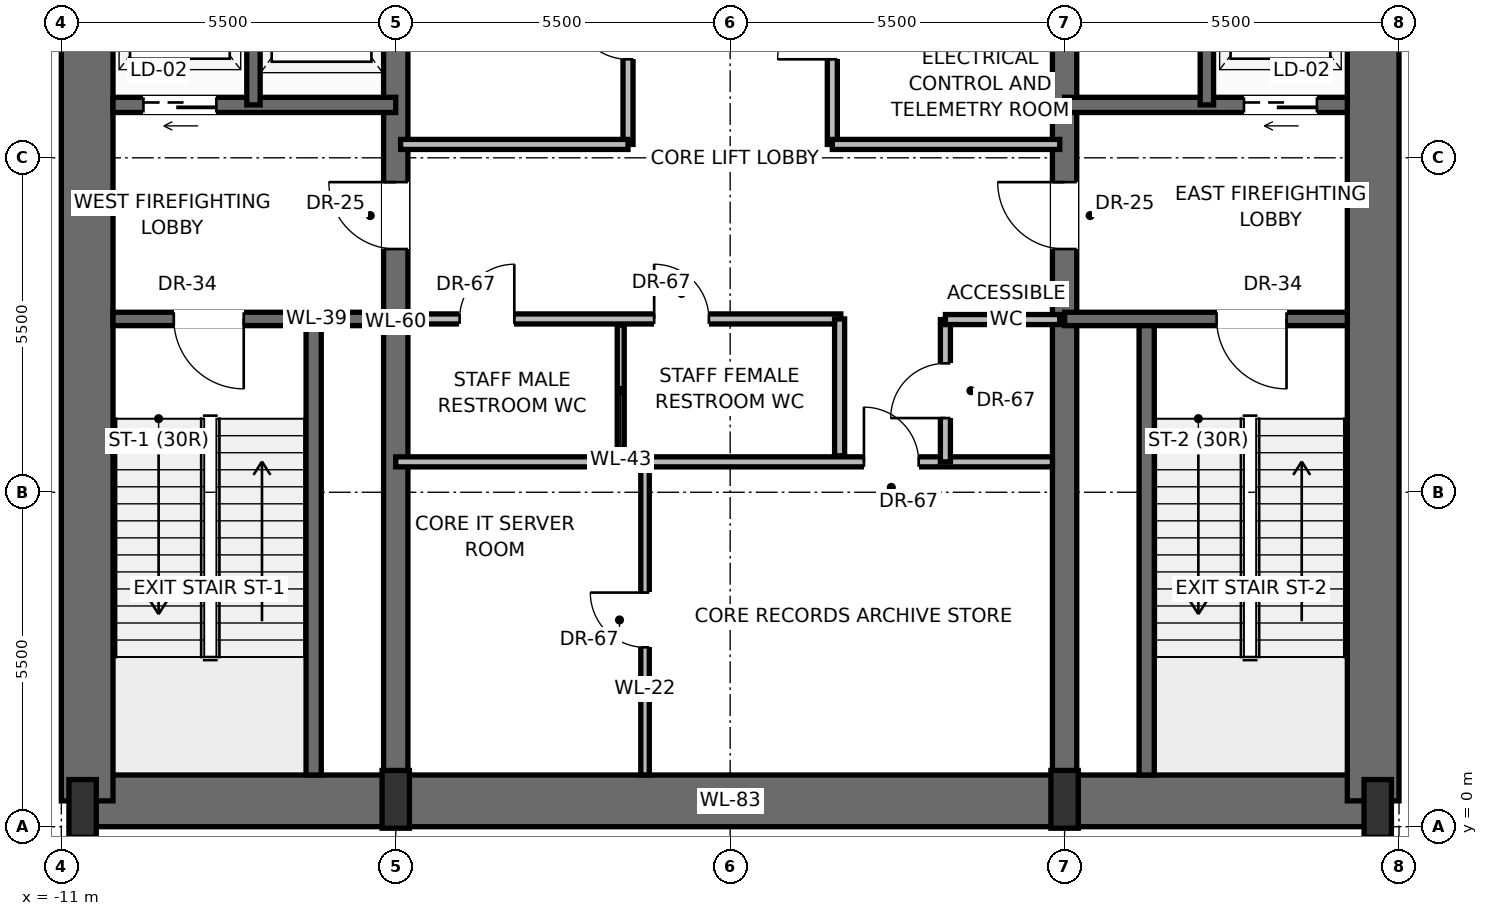
"""IFC4 building model, lengths in metres.
Left out: names, types, materials, properties, quantities, classifications, styles, units other than length and angle.
Written with IfcOpenShell. Run it as: python <this file> out.ifc"""

import sys

from ifc_helpers import new_model, si_unit, direction, frame, frame_2d, origin, origin_2d, place, context, subcontext, project, spatial, rectangle, extrude, source, transform, mapped, element, fill, save


model = new_model("IFC4")
c1 = context("Model", 3, precision=1e-05, world=origin(), true_north=direction((0.0, 1.0)))
c2 = subcontext(c1, "Body", "Model", "MODEL_VIEW")
j1 = project(units=[si_unit("LENGTHUNIT", "METRE"), si_unit("PLANEANGLEUNIT", "RADIAN")], contexts=[c1])
p1 = place(None, origin())
s1 = spatial("IfcSite", under=j1, at=p1, CompositionType="ELEMENT")
p2 = place(p1, origin())
s2 = spatial("IfcBuilding", under=s1, at=p2, CompositionType="ELEMENT")
p3 = place(p2, frame((0.0, 0.0, -10.0)))
s3 = spatial("IfcBuildingStorey", under=s2, at=p3, CompositionType="ELEMENT", Elevation=-10.0)
p4 = place(p3, frame((-10.65, 0.425, 0.0), z_axis=(0.0, 0.0, 1.0), x_axis=(1.0, 0.0, 0.0)))
e1 = element("IfcWall", 1, at=p4, inside=s3, PredefinedType="SHEAR", context=c2, shape_type="SweptSolid", body=[
    extrude(rectangle(XDim=21.3, YDim=0.85, at=frame_2d((10.65, 0.0))), origin(), (0.0, 0.0, 1.0), 4.6),
])
for number, where, z_axis, x_axis in (
    (2, (-10.575, 0.425, 0.0), (0.0, 0.0, 1.0), (0.0, 1.0, 0.0)),
    (3, (10.575, 0.425, 0.0), (0.0, 0.0, 1.0), (0.0, 1.0, 0.0)),
):
    element("IfcWall", number, at=place(p3, frame(where, z_axis=z_axis, x_axis=x_axis)), inside=s3, PredefinedType="SHEAR", context=c2, shape_type="SweptSolid", body=[
        extrude(rectangle(XDim=15.75, YDim=0.85, at=frame_2d((7.875, 0.0))), origin(), (0.0, 0.0, 1.0), 4.6),
    ])
p5 = place(p3, frame((-5.5, 0.425, 0.0), z_axis=(0.0, 0.0, 1.0), x_axis=(0.0, 1.0, 0.0)))
e4 = element("IfcWall", 4, at=p5, inside=s3, PredefinedType="SHEAR", context=c2, shape_type="SweptSolid", body=[
    extrude(rectangle(XDim=15.75, YDim=0.4, at=frame_2d((7.875, 0.0))), origin(), (0.0, 0.0, 1.0), 4.6),
])
p6 = place(p5, frame((9.075, 0.0, 0.0)))
e5 = element("IfcOpeningElement", 5, at=p6, cuts=e4, PredefinedType="OPENING", context=c2, shape_type="SweptSolid", body=[
    extrude(rectangle(XDim=1.1, YDim=2.2, at=frame_2d((0.55, 1.1))), frame((0.0, 0.21, 0.0), z_axis=(0.0, -1.0, 0.0), x_axis=(1.0, 0.0, 0.0)), (0.0, 0.0, 1.0), 0.42),
])
p7 = place(p3, frame((5.5, 0.425, 0.0), z_axis=(0.0, 0.0, 1.0), x_axis=(0.0, 1.0, 0.0)))
e6 = element("IfcWall", 6, at=p7, inside=s3, PredefinedType="SHEAR", context=c2, shape_type="SweptSolid", body=[
    extrude(rectangle(XDim=15.75, YDim=0.4, at=frame_2d((7.875, 0.0))), origin(), (0.0, 0.0, 1.0), 4.6),
])
p8 = place(p7, frame((9.075, 0.0, 0.0)))
e7 = element("IfcOpeningElement", 7, at=p8, cuts=e6, PredefinedType="OPENING", context=c2, shape_type="SweptSolid", body=[
    extrude(rectangle(XDim=1.1, YDim=2.2, at=frame_2d((0.55, 1.1))), frame((0.0, 0.21, 0.0), z_axis=(0.0, -1.0, 0.0), x_axis=(1.0, 0.0, 0.0)), (0.0, 0.0, 1.0), 0.42),
])
m1 = source(origin(), c2, "Body", "SweptSolid", [
    extrude(rectangle(XDim=0.45, YDim=0.95, at=origin_2d()), origin(), (0.0, 0.0, 1.0), 5.0),
])
for number, where, z_axis, x_axis in (
    (8, (-10.65, 0.3, 0.0), (0.0, 0.0, 1.0), (1.0, 0.0, 0.0)),
    (9, (-5.5, 0.45, 0.0), (0.0, 0.0, 1.0), (1.0, 0.0, 0.0)),
    (10, (5.5, 0.45, 0.0), (0.0, 0.0, 1.0), (1.0, 0.0, 0.0)),
    (11, (10.65, 0.3, 0.0), (0.0, 0.0, 1.0), (1.0, 0.0, 0.0)),
):
    element("IfcColumn", number, at=place(p3, frame(where, z_axis=z_axis, x_axis=x_axis)), inside=s3, PredefinedType="PILASTER", context=c2, shape_type="MappedRepresentation", body=[
        mapped(m1, transform((0.0, 0.0, 0.0), scale=1.0)),
    ])
p9 = place(p3, frame((-6.85, 0.85, 0.0), z_axis=(0.0, 0.0, 1.0), x_axis=(0.0, 1.0, 0.0)))
e12 = element("IfcWall", 12, at=p9, inside=s3, PredefinedType="SOLIDWALL", context=c2, shape_type="SweptSolid", body=[
    extrude(rectangle(XDim=7.5, YDim=0.25, at=frame_2d((3.75, 0.0))), origin(), (0.0, 0.0, 1.0), 4.6),
])
p10 = place(p3, frame((-5.5, 8.35, 0.0), z_axis=(0.0, 0.0, 1.0), x_axis=(-1.0, 0.0, 0.0)))
e13 = element("IfcWall", 13, at=p10, inside=s3, PredefinedType="SOLIDWALL", context=c2, shape_type="SweptSolid", body=[
    extrude(rectangle(XDim=4.65, YDim=0.22, at=frame_2d((2.325, 0.0))), origin(), (0.0, 0.0, 1.0), 4.6),
])
p11 = place(p10, frame((2.5, 0.0, 0.0)))
e14 = element("IfcOpeningElement", 14, at=p11, cuts=e13, PredefinedType="OPENING", context=c2, shape_type="SweptSolid", body=[
    extrude(rectangle(XDim=1.15, YDim=2.2, at=frame_2d((0.575, 1.1))), frame((0.0, 0.12, 0.0), z_axis=(0.0, -1.0, 0.0), x_axis=(1.0, 0.0, 0.0)), (0.0, 0.0, 1.0), 0.24),
])
p12 = place(p3, frame((-5.5, 11.87, 0.0), z_axis=(0.0, 0.0, 1.0), x_axis=(-1.0, 0.0, 0.0)))
e15 = element("IfcWall", 15, at=p12, inside=s3, PredefinedType="SOLIDWALL", context=c2, shape_type="SweptSolid", body=[
    extrude(rectangle(XDim=4.65, YDim=0.25, at=frame_2d((2.325, 0.0))), origin(), (0.0, 0.0, 1.0), 4.6),
])
p13 = place(p12, frame((2.95, 0.0, 0.0)))
e16 = element("IfcOpeningElement", 16, at=p13, cuts=e15, PredefinedType="OPENING", context=c2, shape_type="SweptSolid", body=[
    extrude(rectangle(XDim=1.2, YDim=2.25, at=frame_2d((0.6, 1.125))), frame((0.0, 0.135, 0.0), z_axis=(0.0, -1.0, 0.0), x_axis=(1.0, 0.0, 0.0)), (0.0, 0.0, 1.0), 0.27),
])
p14 = place(p3, frame((-7.84, 11.87, 0.0), z_axis=(0.0, 0.0, 1.0), x_axis=(0.0, 1.0, 0.0)))
e17 = element("IfcWall", 17, at=p14, inside=s3, PredefinedType="SOLIDWALL", context=c2, shape_type="SweptSolid", body=[
    extrude(rectangle(XDim=3.88, YDim=0.22, at=frame_2d((1.94, 0.0))), origin(), (0.0, 0.0, 1.0), 4.6),
])
p15 = place(p3, frame((6.85, 0.85, 0.0), z_axis=(0.0, 0.0, 1.0), x_axis=(0.0, 1.0, 0.0)))
e18 = element("IfcWall", 18, at=p15, inside=s3, PredefinedType="SOLIDWALL", context=c2, shape_type="SweptSolid", body=[
    extrude(rectangle(XDim=7.5, YDim=0.25, at=frame_2d((3.75, 0.0))), origin(), (0.0, 0.0, 1.0), 4.6),
])
p16 = place(p3, frame((10.15, 8.35, 0.0), z_axis=(0.0, 0.0, 1.0), x_axis=(-1.0, 0.0, 0.0)))
e19 = element("IfcWall", 19, at=p16, inside=s3, PredefinedType="SOLIDWALL", context=c2, shape_type="SweptSolid", body=[
    extrude(rectangle(XDim=4.65, YDim=0.22, at=frame_2d((2.325, 0.0))), origin(), (0.0, 0.0, 1.0), 4.6),
])
p17 = place(p16, frame((1.0, 0.0, 0.0)))
e20 = element("IfcOpeningElement", 20, at=p17, cuts=e19, PredefinedType="OPENING", context=c2, shape_type="SweptSolid", body=[
    extrude(rectangle(XDim=1.15, YDim=2.2, at=frame_2d((0.575, 1.1))), frame((0.0, 0.12, 0.0), z_axis=(0.0, -1.0, 0.0), x_axis=(1.0, 0.0, 0.0)), (0.0, 0.0, 1.0), 0.24),
])
p18 = place(p3, frame((10.15, 11.87, 0.0), z_axis=(0.0, 0.0, 1.0), x_axis=(-1.0, 0.0, 0.0)))
e21 = element("IfcWall", 21, at=p18, inside=s3, PredefinedType="SOLIDWALL", context=c2, shape_type="SweptSolid", body=[
    extrude(rectangle(XDim=4.65, YDim=0.25, at=frame_2d((2.325, 0.0))), origin(), (0.0, 0.0, 1.0), 4.6),
])
p19 = place(p18, frame((0.5, 0.0, 0.0)))
e22 = element("IfcOpeningElement", 22, at=p19, cuts=e21, PredefinedType="OPENING", context=c2, shape_type="SweptSolid", body=[
    extrude(rectangle(XDim=1.2, YDim=2.25, at=frame_2d((0.6, 1.125))), frame((0.0, 0.135, 0.0), z_axis=(0.0, -1.0, 0.0), x_axis=(1.0, 0.0, 0.0)), (0.0, 0.0, 1.0), 0.27),
])
p20 = place(p3, frame((7.84, 11.87, 0.0), z_axis=(0.0, 0.0, 1.0), x_axis=(0.0, 1.0, 0.0)))
e23 = element("IfcWall", 23, at=p20, inside=s3, PredefinedType="SOLIDWALL", context=c2, shape_type="SweptSolid", body=[
    extrude(rectangle(XDim=3.88, YDim=0.22, at=frame_2d((1.94, 0.0))), origin(), (0.0, 0.0, 1.0), 4.6),
])
p21 = place(p3, frame((-5.5, 6.0, 0.0), z_axis=(0.0, 0.0, 1.0), x_axis=(1.0, 0.0, 0.0)))
e24 = element("IfcWall", 24, at=p21, inside=s3, PredefinedType="PARTITIONING", context=c2, shape_type="SweptSolid", body=[
    extrude(rectangle(XDim=10.8, YDim=0.165, at=frame_2d((5.4, 0.0))), origin(), (0.0, 0.0, 1.0), 4.592),
])
p22 = place(p21, frame((7.7, 0.0, 0.0)))
e25 = element("IfcOpeningElement", 25, at=p22, cuts=e24, PredefinedType="OPENING", context=c2, shape_type="SweptSolid", body=[
    extrude(rectangle(XDim=0.9, YDim=2.1, at=frame_2d((0.45, 1.05))), frame((0.0, 0.093, 0.0), z_axis=(0.0, -1.0, 0.0), x_axis=(1.0, 0.0, 0.0)), (0.0, 0.0, 1.0), 0.185),
])
p23 = place(p3, frame((-1.4, 0.85, 0.0), z_axis=(0.0, 0.0, 1.0), x_axis=(0.0, 1.0, 0.0)))
e26 = element("IfcWall", 26, at=p23, inside=s3, PredefinedType="PARTITIONING", context=c2, shape_type="SweptSolid", body=[
    extrude(rectangle(XDim=5.03, YDim=0.14, at=frame_2d((2.515, 0.0))), origin(), (0.0, 0.0, 1.0), 4.592),
])
p24 = place(p23, frame((2.1, 0.0, 0.0)))
e27 = element("IfcOpeningElement", 27, at=p24, cuts=e26, PredefinedType="OPENING", context=c2, shape_type="SweptSolid", body=[
    extrude(rectangle(XDim=0.9, YDim=2.1, at=frame_2d((0.45, 1.05))), frame((0.0, 0.08, 0.0), z_axis=(0.0, -1.0, 0.0), x_axis=(1.0, 0.0, 0.0)), (0.0, 0.0, 1.0), 0.16),
])
p25 = place(p3, frame((3.54, 6.0, 0.0), z_axis=(0.0, 0.0, 1.0), x_axis=(0.0, 1.0, 0.0)))
e28 = element("IfcWall", 28, at=p25, inside=s3, PredefinedType="PARTITIONING", context=c2, shape_type="SweptSolid", body=[
    extrude(rectangle(XDim=2.34, YDim=0.165, at=frame_2d((1.17, 0.0))), origin(), (0.0, 0.0, 1.0), 4.592),
])
p26 = place(p25, frame((0.72, 0.0, 0.0)))
e29 = element("IfcOpeningElement", 29, at=p26, cuts=e28, PredefinedType="OPENING", context=c2, shape_type="SweptSolid", body=[
    extrude(rectangle(XDim=0.9, YDim=2.1, at=frame_2d((0.45, 1.05))), frame((0.0, 0.093, 0.0), z_axis=(0.0, -1.0, 0.0), x_axis=(1.0, 0.0, 0.0)), (0.0, 0.0, 1.0), 0.185),
])
p27 = place(p3, frame((3.54, 8.34, 0.0), z_axis=(0.0, 0.0, 1.0), x_axis=(1.0, 0.0, 0.0)))
e30 = element("IfcWall", 30, at=p27, inside=s3, PredefinedType="PARTITIONING", context=c2, shape_type="SweptSolid", body=[
    extrude(rectangle(XDim=1.88, YDim=0.165, at=frame_2d((0.94, 0.0))), origin(), (0.0, 0.0, 1.0), 4.592),
])
p28 = place(p3, frame((-5.3, 8.35, 0.0), z_axis=(0.0, 0.0, 1.0), x_axis=(1.0, 0.0, 0.0)))
e31 = element("IfcWall", 31, at=p28, inside=s3, PredefinedType="PARTITIONING", context=c2, shape_type="SweptSolid", body=[
    extrude(rectangle(XDim=7.12, YDim=0.165, at=frame_2d((3.56, 0.0))), origin(), (0.0, 0.0, 1.0), 4.592),
])
p29 = place(p28, frame((0.85, 0.0, 0.0)))
e32 = element("IfcOpeningElement", 32, at=p29, cuts=e31, PredefinedType="OPENING", context=c2, shape_type="SweptSolid", body=[
    extrude(rectangle(XDim=0.9, YDim=2.1, at=frame_2d((0.45, 1.05))), frame((0.0, 0.093, 0.0), z_axis=(0.0, -1.0, 0.0), x_axis=(1.0, 0.0, 0.0)), (0.0, 0.0, 1.0), 0.185),
])
p30 = place(p28, frame((4.05, 0.0, 0.0)))
e33 = element("IfcOpeningElement", 33, at=p30, cuts=e31, PredefinedType="OPENING", context=c2, shape_type="SweptSolid", body=[
    extrude(rectangle(XDim=0.9, YDim=2.1, at=frame_2d((0.45, 1.05))), frame((0.0, 0.093, 0.0), z_axis=(0.0, -1.0, 0.0), x_axis=(1.0, 0.0, 0.0)), (0.0, 0.0, 1.0), 0.185),
])
p31 = place(p3, frame((1.8, 6.1, 0.0), z_axis=(0.0, 0.0, 1.0), x_axis=(0.0, 1.0, 0.0)))
e34 = element("IfcWall", 34, at=p31, inside=s3, PredefinedType="PARTITIONING", context=c2, shape_type="SweptSolid", body=[
    extrude(rectangle(XDim=2.25, YDim=0.165, at=frame_2d((1.125, 0.0))), origin(), (0.0, 0.0, 1.0), 4.592),
])
p32 = place(p3, frame((-1.8, 6.1, 0.0), z_axis=(0.0, 0.0, 1.0), x_axis=(0.0, 1.0, 0.0)))
e35 = element("IfcWall", 35, at=p32, inside=s3, PredefinedType="PARTITIONING", context=c2, shape_type="SweptSolid", body=[
    extrude(rectangle(XDim=2.15, YDim=0.115, at=frame_2d((1.075, 0.0))), origin(), (0.0, 0.0, 1.0), 4.592),
])
p33 = place(p3, frame((-1.68, 11.22, 0.0), z_axis=(0.0, 0.0, 1.0), x_axis=(0.0, 1.0, 0.0)))
e36 = element("IfcWall", 36, at=p33, inside=s3, PredefinedType="PARTITIONING", context=c2, shape_type="SweptSolid", body=[
    extrude(rectangle(XDim=4.56, YDim=0.165, at=frame_2d((2.28, 0.0))), origin(), (0.0, 0.0, 1.0), 4.592),
])
p34 = place(p33, frame((1.4, 0.0, 0.0)))
e37 = element("IfcOpeningElement", 37, at=p34, cuts=e36, PredefinedType="OPENING", context=c2, shape_type="SweptSolid", body=[
    extrude(rectangle(XDim=0.9, YDim=2.1, at=frame_2d((0.45, 1.05))), frame((0.0, 0.093, 0.0), z_axis=(0.0, -1.0, 0.0), x_axis=(1.0, 0.0, 0.0)), (0.0, 0.0, 1.0), 0.185),
])
p35 = place(p3, frame((-5.42, 11.22, 0.0), z_axis=(0.0, 0.0, 1.0), x_axis=(1.0, 0.0, 0.0)))
e38 = element("IfcWall", 38, at=p35, inside=s3, PredefinedType="PARTITIONING", context=c2, shape_type="SweptSolid", body=[
    extrude(rectangle(XDim=3.74, YDim=0.165, at=frame_2d((1.87, 0.0))), origin(), (0.0, 0.0, 1.0), 4.592),
])
p36 = place(p3, frame((1.68, 11.22, 0.0), z_axis=(0.0, 0.0, 1.0), x_axis=(0.0, 1.0, 0.0)))
e39 = element("IfcWall", 39, at=p36, inside=s3, PredefinedType="PARTITIONING", context=c2, shape_type="SweptSolid", body=[
    extrude(rectangle(XDim=4.56, YDim=0.165, at=frame_2d((2.28, 0.0))), origin(), (0.0, 0.0, 1.0), 4.592),
])
p37 = place(p36, frame((1.4, 0.0, 0.0)))
e40 = element("IfcOpeningElement", 40, at=p37, cuts=e39, PredefinedType="OPENING", context=c2, shape_type="SweptSolid", body=[
    extrude(rectangle(XDim=0.9, YDim=2.1, at=frame_2d((0.45, 1.05))), frame((0.0, 0.093, 0.0), z_axis=(0.0, -1.0, 0.0), x_axis=(1.0, 0.0, 0.0)), (0.0, 0.0, 1.0), 0.185),
])
p38 = place(p3, frame((1.68, 11.22, 0.0), z_axis=(0.0, 0.0, 1.0), x_axis=(1.0, 0.0, 0.0)))
e41 = element("IfcWall", 41, at=p38, inside=s3, PredefinedType="PARTITIONING", context=c2, shape_type="SweptSolid", body=[
    extrude(rectangle(XDim=3.74, YDim=0.165, at=frame_2d((1.87, 0.0))), origin(), (0.0, 0.0, 1.0), 4.592),
])
m2 = source(origin(), c2, "Body", "SweptSolid", [
    extrude(rectangle(XDim=1.15, YDim=2.2, at=frame_2d((0.575, 1.1))), frame((0.0, 0.025, 0.0), z_axis=(0.0, -1.0, 0.0), x_axis=(1.0, 0.0, 0.0)), (0.0, 0.0, 1.0), 0.05),
])
p39 = place(p11, origin())
e42 = element("IfcDoor", 42, at=p39, inside=s3, OperationType="SINGLE_SWING_LEFT", PredefinedType="DOOR", context=c2, shape_type="MappedRepresentation", body=[
    mapped(m2, transform((0.0, 0.0, 0.0), scale=1.0)),
])
fill(e14, e42)
m3 = source(origin(), c2, "Body", "SweptSolid", [
    extrude(rectangle(XDim=1.1, YDim=2.2, at=frame_2d((0.55, 1.1))), frame((0.0, 0.025, 0.0), z_axis=(0.0, -1.0, 0.0), x_axis=(1.0, 0.0, 0.0)), (0.0, 0.0, 1.0), 0.05),
])
p40 = place(p6, origin())
e43 = element("IfcDoor", 43, at=p40, inside=s3, OperationType="SINGLE_SWING_RIGHT", PredefinedType="DOOR", context=c2, shape_type="MappedRepresentation", body=[
    mapped(m3, transform((0.0, 0.0, 0.0), scale=1.0)),
])
fill(e5, e43)
m4 = source(origin(), c2, "Body", "SweptSolid", [
    extrude(rectangle(XDim=1.2, YDim=2.25, at=frame_2d((0.6, 1.125))), frame((0.0, 0.025, 0.0), z_axis=(0.0, -1.0, 0.0), x_axis=(1.0, 0.0, 0.0)), (0.0, 0.0, 1.0), 0.05),
])
p41 = place(p13, origin())
e44 = element("IfcDoor", 44, at=p41, inside=s3, OperationType="SLIDING_TO_LEFT", PredefinedType="DOOR", context=c2, shape_type="MappedRepresentation", body=[
    mapped(m4, transform((0.0, 0.0, 0.0), scale=1.0)),
])
fill(e16, e44)
p42 = place(p17, origin())
e45 = element("IfcDoor", 45, at=p42, inside=s3, OperationType="SINGLE_SWING_LEFT", PredefinedType="DOOR", context=c2, shape_type="MappedRepresentation", body=[
    mapped(m2, transform((0.0, 0.0, 0.0), scale=1.0)),
])
fill(e20, e45)
p43 = place(p8, origin())
e46 = element("IfcDoor", 46, at=p43, inside=s3, OperationType="SINGLE_SWING_RIGHT", PredefinedType="DOOR", context=c2, shape_type="MappedRepresentation", body=[
    mapped(m3, transform((0.0, 0.0, 0.0), scale=1.0)),
])
fill(e7, e46)
p44 = place(p19, origin())
e47 = element("IfcDoor", 47, at=p44, inside=s3, OperationType="SLIDING_TO_RIGHT", PredefinedType="DOOR", context=c2, shape_type="MappedRepresentation", body=[
    mapped(m4, transform((0.0, 0.0, 0.0), scale=1.0)),
])
fill(e22, e47)
m5 = source(origin(), c2, "Body", "SweptSolid", [
    extrude(rectangle(XDim=0.9, YDim=2.1, at=frame_2d((0.45, 1.05))), frame((0.0, 0.025, 0.0), z_axis=(0.0, -1.0, 0.0), x_axis=(1.0, 0.0, 0.0)), (0.0, 0.0, 1.0), 0.05),
])
p45 = place(p22, origin())
e48 = element("IfcDoor", 48, at=p45, inside=s3, OperationType="SINGLE_SWING_LEFT", PredefinedType="DOOR", context=c2, shape_type="MappedRepresentation", body=[
    mapped(m5, transform((0.0, 0.0, 0.0), scale=1.0)),
])
fill(e25, e48)
p46 = place(p24, origin())
e49 = element("IfcDoor", 49, at=p46, inside=s3, OperationType="SINGLE_SWING_RIGHT", PredefinedType="DOOR", context=c2, shape_type="MappedRepresentation", body=[
    mapped(m5, transform((0.0, 0.0, 0.0), scale=1.0)),
])
fill(e27, e49)
p47 = place(p26, origin())
e50 = element("IfcDoor", 50, at=p47, inside=s3, OperationType="SINGLE_SWING_LEFT", PredefinedType="DOOR", context=c2, shape_type="MappedRepresentation", body=[
    mapped(m5, transform((0.0, 0.0, 0.0), scale=1.0)),
])
fill(e29, e50)
p48 = place(p29, origin())
e51 = element("IfcDoor", 51, at=p48, inside=s3, OperationType="SINGLE_SWING_RIGHT", PredefinedType="DOOR", context=c2, shape_type="MappedRepresentation", body=[
    mapped(m5, transform((0.0, 0.0, 0.0), scale=1.0)),
])
fill(e32, e51)
p49 = place(p30, origin())
e52 = element("IfcDoor", 52, at=p49, inside=s3, OperationType="SINGLE_SWING_LEFT", PredefinedType="DOOR", context=c2, shape_type="MappedRepresentation", body=[
    mapped(m5, transform((0.0, 0.0, 0.0), scale=1.0)),
])
fill(e33, e52)
p50 = place(p34, origin())
e53 = element("IfcDoor", 53, at=p50, inside=s3, OperationType="SINGLE_SWING_RIGHT", PredefinedType="DOOR", context=c2, shape_type="MappedRepresentation", body=[
    mapped(m5, transform((0.0, 0.0, 0.0), scale=1.0)),
])
fill(e37, e53)
p51 = place(p37, origin())
e54 = element("IfcDoor", 54, at=p51, inside=s3, OperationType="SINGLE_SWING_LEFT", PredefinedType="DOOR", context=c2, shape_type="MappedRepresentation", body=[
    mapped(m5, transform((0.0, 0.0, 0.0), scale=1.0)),
])
fill(e40, e54)
save(model, sys.argv[1])
